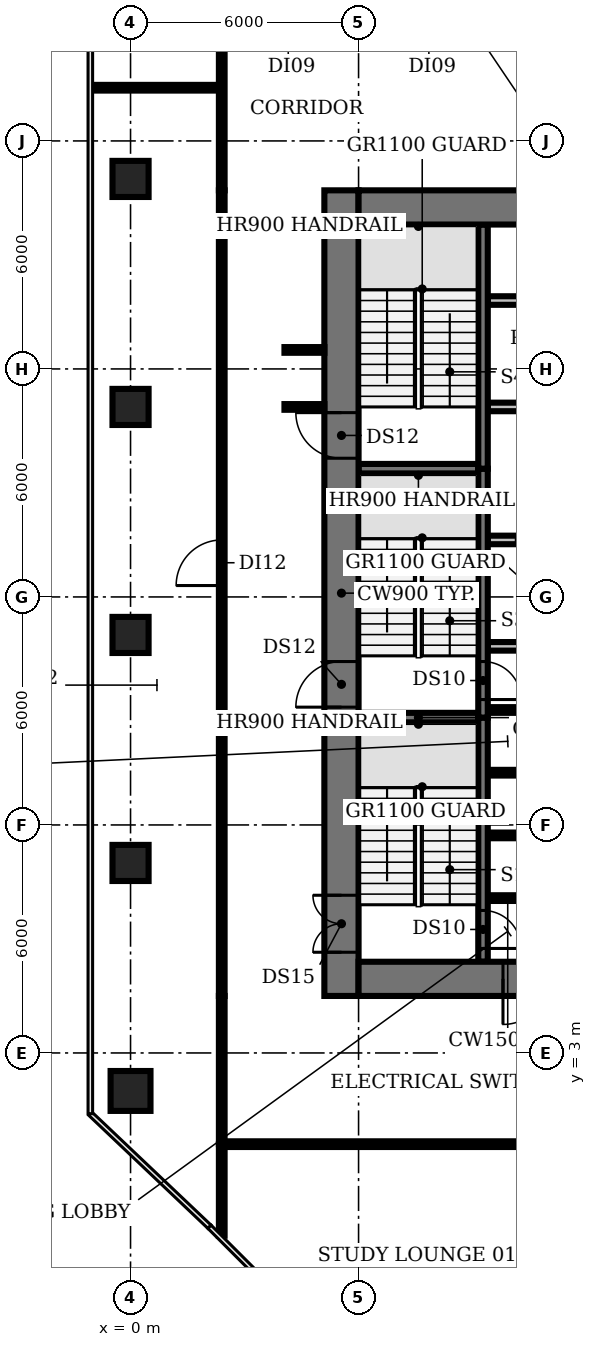
"""IFC4 building model, lengths in metres.
Left out: names, types, materials, properties, quantities, classifications, styles, units other than length and angle.
Written with IfcOpenShell. Run it as: python <this file> out.ifc"""

import sys

from ifc_helpers import new_model, si_unit, direction, frame, frame_2d, origin, origin_2d, place, context, subcontext, project, spatial, rectangle, circle, extrude, element, fill, save


model = new_model("IFC4")
c1 = context("Model", 3, precision=1e-05, world=origin(), true_north=direction((0.0, 1.0)))
c2 = subcontext(c1, "Body", "Model", "MODEL_VIEW")
j1 = project(units=[si_unit("LENGTHUNIT", "METRE"), si_unit("PLANEANGLEUNIT", "RADIAN")], contexts=[c1])
p1 = place(None, origin())
s1 = spatial("IfcSite", under=j1, at=p1, CompositionType="ELEMENT")
p2 = place(p1, origin())
s2 = spatial("IfcBuilding", under=s1, at=p2, CompositionType="ELEMENT")
p3 = place(p2, frame((0.0, 0.0, 58.4)))
s3 = spatial("IfcBuildingStorey", under=s2, at=p3, CompositionType="ELEMENT", Elevation=58.4)
p4 = place(p3, frame((0.0, 2.0, 0.0), z_axis=(0.0, 0.0, 1.0), x_axis=(1.0, 0.0, 0.0)))
e1 = element("IfcColumn", 1, at=p4, inside=s3, PredefinedType="COLUMN", context=c2, shape_type="SweptSolid", body=[
    extrude(circle(Radius=0.525, at=origin_2d()), origin(), (0.0, 0.0, 1.0), 3.85),
])
for number, where, z_axis, x_axis in (
    (2, (0.0, 8.0, 0.0), (0.0, 0.0, 1.0), (1.0, 0.0, 0.0)),
    (3, (0.0, 14.0, 0.0), (0.0, 0.0, 1.0), (1.0, 0.0, 0.0)),
    (4, (0.0, 20.0, 0.0), (0.0, 0.0, 1.0), (1.0, 0.0, 0.0)),
    (5, (0.0, 26.0, 0.0), (0.0, 0.0, 1.0), (1.0, 0.0, 0.0)),
):
    element("IfcColumn", number, at=place(p3, frame(where, z_axis=z_axis, x_axis=x_axis)), inside=s3, PredefinedType="COLUMN", context=c2, shape_type="SweptSolid", body=[
        extrude(rectangle(XDim=0.95, YDim=0.95, at=origin_2d()), origin(), (0.0, 0.0, 1.0), 3.85),
    ])
for number, where, z_axis, x_axis in (
    (6, (9.4, 7.075, 0.0), (0.0, 0.0, 1.0), (1.0, 0.0, 0.0)),
    (7, (9.4, 8.725, 0.0), (0.0, 0.0, 1.0), (1.0, 0.0, 0.0)),
    (8, (9.4, 10.375, 0.0), (0.0, 0.0, 1.0), (1.0, 0.0, 0.0)),
):
    element("IfcWall", number, at=place(p3, frame(where, z_axis=z_axis, x_axis=x_axis)), inside=s3, PredefinedType="SHEAR", context=c2, shape_type="SweptSolid", body=[
        extrude(rectangle(XDim=1.05, YDim=0.15, at=frame_2d((0.525, 0.0))), origin(), (0.0, 0.0, 1.0), 3.85),
    ])
p5 = place(p3, frame((6.0, 11.825, 0.0), z_axis=(0.0, 0.0, 1.0), x_axis=(1.0, 0.0, 0.0)))
e9 = element("IfcWall", 9, at=p5, inside=s3, PredefinedType="SHEAR", context=c2, shape_type="SweptSolid", body=[
    extrude(rectangle(XDim=3.15, YDim=0.25, at=frame_2d((1.575, 0.0))), origin(), (0.0, 0.0, 1.0), 3.85),
])
p6 = place(p3, frame((9.4, 12.025, 0.0), z_axis=(0.0, 0.0, 1.0), x_axis=(1.0, 0.0, 0.0)))
e10 = element("IfcWall", 10, at=p6, inside=s3, PredefinedType="SHEAR", context=c2, shape_type="SweptSolid", body=[
    extrude(rectangle(XDim=1.05, YDim=0.15, at=frame_2d((0.525, 0.0))), origin(), (0.0, 0.0, 1.0), 3.85),
])
p7 = place(p3, frame((9.4, 13.7, 0.0), z_axis=(0.0, 0.0, 1.0), x_axis=(1.0, 0.0, 0.0)))
e11 = element("IfcWall", 11, at=p7, inside=s3, PredefinedType="PARTITIONING", context=c2, shape_type="SweptSolid", body=[
    extrude(rectangle(XDim=4.0, YDim=0.225, at=frame_2d((2.0, 0.0))), origin(), (0.0, 0.0, 1.0), 3.85),
])
p8 = place(p3, frame((9.4, 16.5, 0.0), z_axis=(0.0, 0.0, 1.0), x_axis=(1.0, 0.0, 0.0)))
e12 = element("IfcWall", 12, at=p8, inside=s3, PredefinedType="PARTITIONING", context=c2, shape_type="SweptSolid", body=[
    extrude(rectangle(XDim=14.6, YDim=0.225, at=frame_2d((7.3, 0.0))), origin(), (0.0, 0.0, 1.0), 3.85),
])
p9 = place(p8, frame((0.75, 0.0, 0.0)))
e13 = element("IfcOpeningElement", 13, at=p9, cuts=e12, PredefinedType="OPENING", context=c2, shape_type="SweptSolid", body=[
    extrude(rectangle(XDim=1.1, YDim=2.1, at=frame_2d((0.55, 1.05))), frame((0.0, 0.123, 0.0), z_axis=(0.0, -1.0, 0.0), x_axis=(1.0, 0.0, 0.0)), (0.0, 0.0, 1.0), 0.245),
])
p10 = place(p8, frame((3.55, 0.0, 0.0)))
e14 = element("IfcOpeningElement", 14, at=p10, cuts=e12, PredefinedType="OPENING", context=c2, shape_type="SweptSolid", body=[
    extrude(rectangle(XDim=1.1, YDim=2.1, at=frame_2d((0.55, 1.05))), frame((0.0, 0.123, 0.0), z_axis=(0.0, -1.0, 0.0), x_axis=(1.0, 0.0, 0.0)), (0.0, 0.0, 1.0), 0.245),
])
p11 = place(p8, frame((6.35, 0.0, 0.0)))
e15 = element("IfcOpeningElement", 15, at=p11, cuts=e12, PredefinedType="OPENING", context=c2, shape_type="SweptSolid", body=[
    extrude(rectangle(XDim=1.1, YDim=2.1, at=frame_2d((0.55, 1.05))), frame((0.0, 0.123, 0.0), z_axis=(0.0, -1.0, 0.0), x_axis=(1.0, 0.0, 0.0)), (0.0, 0.0, 1.0), 0.245),
])
p12 = place(p8, frame((9.15, 0.0, 0.0)))
e16 = element("IfcOpeningElement", 16, at=p12, cuts=e12, PredefinedType="OPENING", context=c2, shape_type="SweptSolid", body=[
    extrude(rectangle(XDim=1.1, YDim=2.1, at=frame_2d((0.55, 1.05))), frame((0.0, 0.123, 0.0), z_axis=(0.0, -1.0, 0.0), x_axis=(1.0, 0.0, 0.0)), (0.0, 0.0, 1.0), 0.245),
])
p13 = place(p8, frame((11.647, 0.0, 0.0)))
e17 = element("IfcOpeningElement", 17, at=p13, cuts=e12, PredefinedType="OPENING", context=c2, shape_type="SweptSolid", body=[
    extrude(rectangle(XDim=0.9, YDim=2.1, at=frame_2d((0.45, 1.05))), frame((0.0, 0.123, 0.0), z_axis=(0.0, -1.0, 0.0), x_axis=(1.0, 0.0, 0.0)), (0.0, 0.0, 1.0), 0.245),
])
p14 = place(p8, frame((13.423, 0.0, 0.0)))
e18 = element("IfcOpeningElement", 18, at=p14, cuts=e12, PredefinedType="OPENING", context=c2, shape_type="SweptSolid", body=[
    extrude(rectangle(XDim=0.9, YDim=2.1, at=frame_2d((0.45, 1.05))), frame((0.0, 0.123, 0.0), z_axis=(0.0, -1.0, 0.0), x_axis=(1.0, 0.0, 0.0)), (0.0, 0.0, 1.0), 0.245),
])
p15 = place(p3, frame((6.0, 18.375, 0.0), z_axis=(0.0, 0.0, 1.0), x_axis=(1.0, 0.0, 0.0)))
e19 = element("IfcWall", 19, at=p15, inside=s3, PredefinedType="SHEAR", context=c2, shape_type="SweptSolid", body=[
    extrude(rectangle(XDim=3.15, YDim=0.25, at=frame_2d((1.575, 0.0))), origin(), (0.0, 0.0, 1.0), 3.85),
])
p16 = place(p3, frame((24.0, 20.0, 0.0), z_axis=(0.0, 0.0, 1.0), x_axis=(-1.0, 0.0, 0.0)))
e20 = element("IfcWall", 20, at=p16, inside=s3, PredefinedType="PARTITIONING", context=c2, shape_type="SweptSolid", body=[
    extrude(rectangle(XDim=14.6, YDim=0.225, at=frame_2d((7.3, 0.0))), origin(), (0.0, 0.0, 1.0), 3.85),
])
p17 = place(p16, frame((12.5, 0.0, 0.0)))
e21 = element("IfcOpeningElement", 21, at=p17, cuts=e20, PredefinedType="OPENING", context=c2, shape_type="SweptSolid", body=[
    extrude(rectangle(XDim=1.0, YDim=2.1, at=frame_2d((0.5, 1.05))), frame((0.0, 0.123, 0.0), z_axis=(0.0, -1.0, 0.0), x_axis=(1.0, 0.0, 0.0)), (0.0, 0.0, 1.0), 0.245),
])
p18 = place(p16, frame((8.825, 0.0, 0.0)))
e22 = element("IfcOpeningElement", 22, at=p18, cuts=e20, PredefinedType="OPENING", context=c2, shape_type="SweptSolid", body=[
    extrude(rectangle(XDim=1.0, YDim=2.1, at=frame_2d((0.5, 1.05))), frame((0.0, 0.123, 0.0), z_axis=(0.0, -1.0, 0.0), x_axis=(1.0, 0.0, 0.0)), (0.0, 0.0, 1.0), 0.245),
])
p19 = place(p16, frame((4.925, 0.0, 0.0)))
e23 = element("IfcOpeningElement", 23, at=p19, cuts=e20, PredefinedType="OPENING", context=c2, shape_type="SweptSolid", body=[
    extrude(rectangle(XDim=1.0, YDim=2.1, at=frame_2d((0.5, 1.05))), frame((0.0, 0.123, 0.0), z_axis=(0.0, -1.0, 0.0), x_axis=(1.0, 0.0, 0.0)), (0.0, 0.0, 1.0), 0.245),
])
p20 = place(p16, frame((2.137, 0.0, 0.0)))
e24 = element("IfcOpeningElement", 24, at=p20, cuts=e20, PredefinedType="OPENING", context=c2, shape_type="SweptSolid", body=[
    extrude(rectangle(XDim=0.9, YDim=2.1, at=frame_2d((0.45, 1.05))), frame((0.0, 0.123, 0.0), z_axis=(0.0, -1.0, 0.0), x_axis=(1.0, 0.0, 0.0)), (0.0, 0.0, 1.0), 0.245),
])
p21 = place(p16, frame((0.363, 0.0, 0.0)))
e25 = element("IfcOpeningElement", 25, at=p21, cuts=e20, PredefinedType="OPENING", context=c2, shape_type="SweptSolid", body=[
    extrude(rectangle(XDim=0.9, YDim=2.1, at=frame_2d((0.45, 1.05))), frame((0.0, 0.123, 0.0), z_axis=(0.0, -1.0, 0.0), x_axis=(1.0, 0.0, 0.0)), (0.0, 0.0, 1.0), 0.245),
])
p22 = place(p3, frame((9.4, 22.8, 0.0), z_axis=(0.0, 0.0, 1.0), x_axis=(1.0, 0.0, 0.0)))
e26 = element("IfcWall", 26, at=p22, inside=s3, PredefinedType="PARTITIONING", context=c2, shape_type="SweptSolid", body=[
    extrude(rectangle(XDim=14.6, YDim=0.225, at=frame_2d((7.3, 0.0))), origin(), (0.0, 0.0, 1.0), 3.85),
])
p23 = place(p3, frame((9.275, 11.825, 0.0), z_axis=(0.0, 0.0, 1.0), x_axis=(0.0, -1.0, 0.0)))
e27 = element("IfcWall", 27, at=p23, inside=s3, PredefinedType="SHEAR", context=c2, shape_type="SweptSolid", body=[
    extrude(rectangle(XDim=6.425, YDim=0.25, at=frame_2d((3.212, 0.0))), origin(), (0.0, 0.0, 1.0), 3.85),
])
p24 = place(p23, frame((5.075, 0.0, 0.0)))
e28 = element("IfcOpeningElement", 28, at=p24, cuts=e27, PredefinedType="OPENING", context=c2, shape_type="SweptSolid", body=[
    extrude(rectangle(XDim=1.0, YDim=2.1, at=frame_2d((0.5, 1.05))), frame((0.0, 0.135, 0.0), z_axis=(0.0, -1.0, 0.0), x_axis=(1.0, 0.0, 0.0)), (0.0, 0.0, 1.0), 0.27),
])
p25 = place(p3, frame((9.275, 18.375, 0.0), z_axis=(0.0, 0.0, 1.0), x_axis=(0.0, -1.0, 0.0)))
e29 = element("IfcWall", 29, at=p25, inside=s3, PredefinedType="SHEAR", context=c2, shape_type="SweptSolid", body=[
    extrude(rectangle(XDim=6.55, YDim=0.25, at=frame_2d((3.275, 0.0))), origin(), (0.0, 0.0, 1.0), 3.85),
])
p26 = place(p25, frame((5.075, 0.0, 0.0)))
e30 = element("IfcOpeningElement", 30, at=p26, cuts=e29, PredefinedType="OPENING", context=c2, shape_type="SweptSolid", body=[
    extrude(rectangle(XDim=1.0, YDim=2.1, at=frame_2d((0.5, 1.05))), frame((0.0, 0.135, 0.0), z_axis=(0.0, -1.0, 0.0), x_axis=(1.0, 0.0, 0.0)), (0.0, 0.0, 1.0), 0.27),
])
p27 = place(p3, frame((9.275, 18.375, 0.0), z_axis=(0.0, 0.0, 1.0), x_axis=(0.0, 1.0, 0.0)))
e31 = element("IfcWall", 31, at=p27, inside=s3, PredefinedType="SHEAR", context=c2, shape_type="SweptSolid", body=[
    extrude(rectangle(XDim=6.425, YDim=0.25, at=frame_2d((3.212, 0.0))), origin(), (0.0, 0.0, 1.0), 3.85),
])
p28 = place(p3, frame((5.55, 4.5, 0.0), z_axis=(0.0, 0.0, 1.0), x_axis=(0.0, 1.0, 0.0)))
e32 = element("IfcWall", 32, at=p28, inside=s3, PredefinedType="SHEAR", context=c2, shape_type="SweptSolid", body=[
    extrude(rectangle(XDim=21.2, YDim=0.9, at=frame_2d((10.6, 0.0))), origin(), (0.0, 0.0, 1.0), 3.85),
])
p29 = place(p28, frame((1.15, 0.0, 0.0)))
e33 = element("IfcOpeningElement", 33, at=p29, cuts=e32, PredefinedType="OPENING", context=c2, shape_type="SweptSolid", body=[
    extrude(rectangle(XDim=1.5, YDim=2.1, at=frame_2d((0.75, 1.05))), frame((0.0, 0.46, 0.0), z_axis=(0.0, -1.0, 0.0), x_axis=(1.0, 0.0, 0.0)), (0.0, 0.0, 1.0), 0.92),
])
p30 = place(p28, frame((7.6, 0.0, 0.0)))
e34 = element("IfcOpeningElement", 34, at=p30, cuts=e32, PredefinedType="OPENING", context=c2, shape_type="SweptSolid", body=[
    extrude(rectangle(XDim=1.2, YDim=2.1, at=frame_2d((0.6, 1.05))), frame((0.0, 0.46, 0.0), z_axis=(0.0, -1.0, 0.0), x_axis=(1.0, 0.0, 0.0)), (0.0, 0.0, 1.0), 0.92),
])
p31 = place(p28, frame((14.15, 0.0, 0.0)))
e35 = element("IfcOpeningElement", 35, at=p31, cuts=e32, PredefinedType="OPENING", context=c2, shape_type="SweptSolid", body=[
    extrude(rectangle(XDim=1.2, YDim=2.1, at=frame_2d((0.6, 1.05))), frame((0.0, 0.46, 0.0), z_axis=(0.0, -1.0, 0.0), x_axis=(1.0, 0.0, 0.0)), (0.0, 0.0, 1.0), 0.92),
])
p32 = place(p3, frame((24.0, 4.95, 0.0), z_axis=(0.0, 0.0, 1.0), x_axis=(-1.0, 0.0, 0.0)))
e36 = element("IfcWall", 36, at=p32, inside=s3, PredefinedType="SHEAR", context=c2, shape_type="SweptSolid", body=[
    extrude(rectangle(XDim=18.0, YDim=0.9, at=frame_2d((9.0, 0.0))), origin(), (0.0, 0.0, 1.0), 3.85),
])
p33 = place(p32, frame((13.0, 0.0, 0.0)))
e37 = element("IfcOpeningElement", 37, at=p33, cuts=e36, PredefinedType="OPENING", context=c2, shape_type="SweptSolid", body=[
    extrude(rectangle(XDim=1.2, YDim=2.1, at=frame_2d((0.6, 1.05))), frame((0.0, 0.46, 0.0), z_axis=(0.0, -1.0, 0.0), x_axis=(1.0, 0.0, 0.0)), (0.0, 0.0, 1.0), 0.92),
])
p34 = place(p32, frame((4.9, 0.0, 0.0)))
e38 = element("IfcOpeningElement", 38, at=p34, cuts=e36, PredefinedType="OPENING", context=c2, shape_type="SweptSolid", body=[
    extrude(rectangle(XDim=1.0, YDim=2.1, at=frame_2d((0.5, 1.05))), frame((0.0, 0.46, 0.0), z_axis=(0.0, -1.0, 0.0), x_axis=(1.0, 0.0, 0.0)), (0.0, 0.0, 1.0), 0.92),
])
p35 = place(p3, frame((6.0, 25.25, 0.0), z_axis=(0.0, 0.0, 1.0), x_axis=(1.0, 0.0, 0.0)))
e39 = element("IfcWall", 39, at=p35, inside=s3, PredefinedType="SHEAR", context=c2, shape_type="SweptSolid", body=[
    extrude(rectangle(XDim=18.0, YDim=0.9, at=frame_2d((9.0, 0.0))), origin(), (0.0, 0.0, 1.0), 3.85),
])
p36 = place(p3, frame((-0.998, 28.4, 0.0), z_axis=(0.0, 0.0, 1.0), x_axis=(1.0, 0.0, 0.0)))
e40 = element("IfcWall", 40, at=p36, inside=s3, PredefinedType="PARTITIONING", context=c2, shape_type="SweptSolid", body=[
    extrude(rectangle(XDim=3.398, YDim=0.15, at=frame_2d((1.699, 0.0))), origin(), (0.0, 0.0, 1.0), 2.83),
])
p37 = place(p3, frame((2.4, -1.81, 0.0), z_axis=(0.0, 0.0, 1.0), x_axis=(0.0, 1.0, 0.0)))
e41 = element("IfcWall", 41, at=p37, inside=s3, PredefinedType="PARTITIONING", context=c2, shape_type="SweptSolid", body=[
    extrude(rectangle(XDim=2.41, YDim=0.15, at=frame_2d((1.205, 0.0))), origin(), (0.0, 0.0, 1.0), 2.83),
])
p38 = place(p3, frame((2.4, 0.6, 0.0), z_axis=(0.0, 0.0, 1.0), x_axis=(0.0, 1.0, 0.0)))
e42 = element("IfcWall", 42, at=p38, inside=s3, PredefinedType="PARTITIONING", context=c2, shape_type="SweptSolid", body=[
    extrude(rectangle(XDim=3.9, YDim=0.15, at=frame_2d((1.95, 0.0))), origin(), (0.0, 0.0, 1.0), 2.83),
])
p39 = place(p3, frame((2.4, 4.5, 0.0), z_axis=(0.0, 0.0, 1.0), x_axis=(0.0, 1.0, 0.0)))
e43 = element("IfcWall", 43, at=p39, inside=s3, PredefinedType="PARTITIONING", context=c2, shape_type="SweptSolid", body=[
    extrude(rectangle(XDim=21.2, YDim=0.15, at=frame_2d((10.6, 0.0))), origin(), (0.0, 0.0, 1.0), 2.83),
])
p40 = place(p39, frame((10.8, 0.0, 0.0)))
e44 = element("IfcOpeningElement", 44, at=p40, cuts=e43, PredefinedType="OPENING", context=c2, shape_type="SweptSolid", body=[
    extrude(rectangle(XDim=1.2, YDim=2.1, at=frame_2d((0.6, 1.05))), frame((0.0, 0.085, 0.0), z_axis=(0.0, -1.0, 0.0), x_axis=(1.0, 0.0, 0.0)), (0.0, 0.0, 1.0), 0.17),
])
p41 = place(p3, frame((2.4, 25.7, 0.0), z_axis=(0.0, 0.0, 1.0), x_axis=(0.0, 1.0, 0.0)))
e45 = element("IfcWall", 45, at=p41, inside=s3, PredefinedType="PARTITIONING", context=c2, shape_type="SweptSolid", body=[
    extrude(rectangle(XDim=3.9, YDim=0.15, at=frame_2d((1.95, 0.0))), origin(), (0.0, 0.0, 1.0), 2.83),
])
for number, where, z_axis, x_axis in (
    (46, (4.05, 20.0, 0.0), (0.0, 0.0, 1.0), (1.0, 0.0, 0.0)),
    (47, (4.05, 21.5, 0.0), (0.0, 0.0, 1.0), (1.0, 0.0, 0.0)),
):
    element("IfcWall", number, at=place(p3, frame(where, z_axis=z_axis, x_axis=x_axis)), inside=s3, PredefinedType="PARTITIONING", context=c2, shape_type="SweptSolid", body=[
        extrude(rectangle(XDim=1.05, YDim=0.15, at=frame_2d((0.525, 0.0))), origin(), (0.0, 0.0, 1.0), 2.83),
    ])
p42 = place(p3, frame((27.6, 0.6, 0.0), z_axis=(0.0, 0.0, 1.0), x_axis=(-1.0, 0.0, 0.0)))
e48 = element("IfcWall", 48, at=p42, inside=s3, PredefinedType="PARTITIONING", context=c2, shape_type="SweptSolid", body=[
    extrude(rectangle(XDim=25.2, YDim=0.15, at=frame_2d((12.6, 0.0))), origin(), (0.0, 0.0, 1.0), 2.83),
])
p43 = place(p42, frame((12.1, 0.0, 0.0)))
e49 = element("IfcOpeningElement", 49, at=p43, cuts=e48, PredefinedType="OPENING", context=c2, shape_type="SweptSolid", body=[
    extrude(rectangle(XDim=1.2, YDim=2.1, at=frame_2d((0.6, 1.05))), frame((0.0, 0.085, 0.0), z_axis=(0.0, -1.0, 0.0), x_axis=(1.0, 0.0, 0.0)), (0.0, 0.0, 1.0), 0.17),
])
p44 = place(p24, origin())
e50 = element("IfcDoor", 50, at=p44, inside=s3, OperationType="SINGLE_SWING_RIGHT", PredefinedType="DOOR", context=c2, shape_type="SweptSolid", body=[
    extrude(rectangle(XDim=1.0, YDim=2.1, at=frame_2d((0.5, 1.05))), frame((0.0, 0.025, 0.0), z_axis=(0.0, -1.0, 0.0), x_axis=(1.0, 0.0, 0.0)), (0.0, 0.0, 1.0), 0.05),
])
fill(e28, e50)
p45 = place(p26, origin())
e51 = element("IfcDoor", 51, at=p45, inside=s3, OperationType="SINGLE_SWING_RIGHT", PredefinedType="DOOR", context=c2, shape_type="SweptSolid", body=[
    extrude(rectangle(XDim=1.0, YDim=2.1, at=frame_2d((0.5, 1.05))), frame((0.0, 0.025, 0.0), z_axis=(0.0, -1.0, 0.0), x_axis=(1.0, 0.0, 0.0)), (0.0, 0.0, 1.0), 0.05),
])
fill(e30, e51)
p46 = place(p29, origin())
e52 = element("IfcDoor", 52, at=p46, inside=s3, OperationType="DOUBLE_DOOR_SINGLE_SWING", PredefinedType="DOOR", context=c2, shape_type="SweptSolid", body=[
    extrude(rectangle(XDim=1.5, YDim=2.1, at=frame_2d((0.75, 1.05))), frame((0.0, 0.025, 0.0), z_axis=(0.0, -1.0, 0.0), x_axis=(1.0, 0.0, 0.0)), (0.0, 0.0, 1.0), 0.05),
])
fill(e33, e52)
p47 = place(p30, origin())
e53 = element("IfcDoor", 53, at=p47, inside=s3, OperationType="SINGLE_SWING_LEFT", PredefinedType="DOOR", context=c2, shape_type="SweptSolid", body=[
    extrude(rectangle(XDim=1.2, YDim=2.1, at=frame_2d((0.6, 1.05))), frame((0.0, 0.025, 0.0), z_axis=(0.0, -1.0, 0.0), x_axis=(1.0, 0.0, 0.0)), (0.0, 0.0, 1.0), 0.05),
])
fill(e34, e53)
p48 = place(p31, origin())
e54 = element("IfcDoor", 54, at=p48, inside=s3, OperationType="SINGLE_SWING_RIGHT", PredefinedType="DOOR", context=c2, shape_type="SweptSolid", body=[
    extrude(rectangle(XDim=1.2, YDim=2.1, at=frame_2d((0.6, 1.05))), frame((0.0, 0.025, 0.0), z_axis=(0.0, -1.0, 0.0), x_axis=(1.0, 0.0, 0.0)), (0.0, 0.0, 1.0), 0.05),
])
fill(e35, e54)
p49 = place(p33, origin())
e55 = element("IfcDoor", 55, at=p49, inside=s3, OperationType="SINGLE_SWING_RIGHT", PredefinedType="DOOR", context=c2, shape_type="SweptSolid", body=[
    extrude(rectangle(XDim=1.2, YDim=2.1, at=frame_2d((0.6, 1.05))), frame((0.0, 0.025, 0.0), z_axis=(0.0, -1.0, 0.0), x_axis=(1.0, 0.0, 0.0)), (0.0, 0.0, 1.0), 0.05),
])
fill(e37, e55)
p50 = place(p40, origin())
e56 = element("IfcDoor", 56, at=p50, inside=s3, OperationType="SINGLE_SWING_LEFT", PredefinedType="DOOR", context=c2, shape_type="SweptSolid", body=[
    extrude(rectangle(XDim=1.2, YDim=2.1, at=frame_2d((0.6, 1.05))), frame((0.0, 0.025, 0.0), z_axis=(0.0, -1.0, 0.0), x_axis=(1.0, 0.0, 0.0)), (0.0, 0.0, 1.0), 0.05),
])
fill(e44, e56)
save(model, sys.argv[1])
